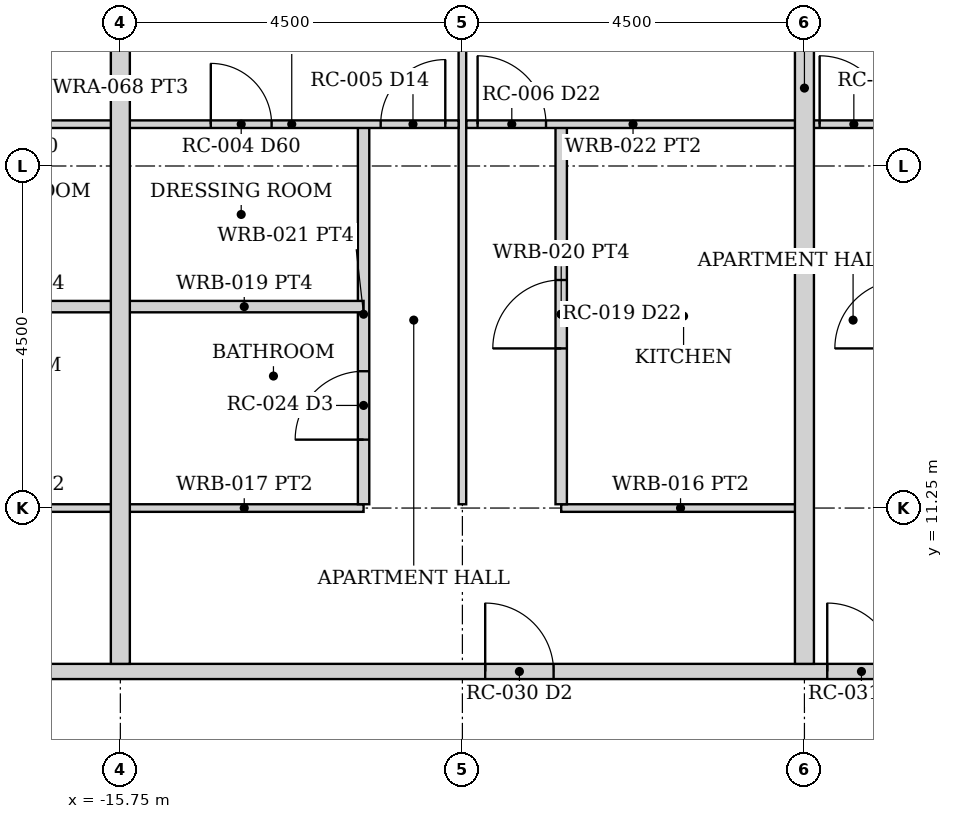
"""IFC4 building model, lengths in metres.
Left out: names, types, materials, properties, quantities, classifications, styles, units other than length and angle.
Written with IfcOpenShell. Run it as: python <this file> out.ifc"""

import sys

from ifc_helpers import new_model, si_unit, direction, frame, frame_2d, origin, place, context, subcontext, project, spatial, rectangle, extrude, element, fill, save


model = new_model("IFC4")
c1 = context("Model", 3, precision=1e-05, world=origin(), true_north=direction((0.0, 1.0)))
c2 = subcontext(c1, "Body", "Model", "MODEL_VIEW")
j1 = project(units=[si_unit("LENGTHUNIT", "METRE"), si_unit("PLANEANGLEUNIT", "RADIAN")], contexts=[c1])
p1 = place(None, origin())
s1 = spatial("IfcSite", under=j1, at=p1, CompositionType="ELEMENT")
p2 = place(p1, origin())
s2 = spatial("IfcBuilding", under=s1, at=p2, CompositionType="ELEMENT")
p3 = place(p2, frame((0.0, 0.0, 47.5)))
s3 = spatial("IfcBuildingStorey", under=s2, at=p3, CompositionType="ELEMENT", Elevation=47.5)
p4 = place(p3, frame((-24.55, 9.1, 0.0), z_axis=(0.0, 0.0, 1.0), x_axis=(1.0, 0.0, 0.0)))
e1 = element("IfcWall", 1, at=p4, inside=s3, PredefinedType="PARTITIONING", context=c2, shape_type="SweptSolid", body=[
    extrude(rectangle(XDim=49.1, YDim=0.2, at=frame_2d((24.55, 0.0))), origin(), (0.0, 0.0, 1.0), 2.373),
])
p5 = place(p4, frame((5.1, 0.0, 0.0)))
e2 = element("IfcOpeningElement", 2, at=p5, cuts=e1, PredefinedType="OPENING", context=c2, shape_type="SweptSolid", body=[
    extrude(rectangle(XDim=0.9, YDim=2.1, at=frame_2d((0.45, 1.05))), frame((0.0, 0.11, 0.0), z_axis=(0.0, -1.0, 0.0), x_axis=(1.0, 0.0, 0.0)), (0.0, 0.0, 1.0), 0.22),
])
p6 = place(p4, frame((13.6, 0.0, 0.0)))
e3 = element("IfcOpeningElement", 3, at=p6, cuts=e1, PredefinedType="OPENING", context=c2, shape_type="SweptSolid", body=[
    extrude(rectangle(XDim=0.9, YDim=2.1, at=frame_2d((0.45, 1.05))), frame((0.0, 0.11, 0.0), z_axis=(0.0, -1.0, 0.0), x_axis=(1.0, 0.0, 0.0)), (0.0, 0.0, 1.0), 0.22),
])
p7 = place(p4, frame((18.1, 0.0, 0.0)))
e4 = element("IfcOpeningElement", 4, at=p7, cuts=e1, PredefinedType="OPENING", context=c2, shape_type="SweptSolid", body=[
    extrude(rectangle(XDim=0.9, YDim=2.1, at=frame_2d((0.45, 1.05))), frame((0.0, 0.11, 0.0), z_axis=(0.0, -1.0, 0.0), x_axis=(1.0, 0.0, 0.0)), (0.0, 0.0, 1.0), 0.22),
])
p8 = place(p4, frame((31.6, 0.0, 0.0)))
e5 = element("IfcOpeningElement", 5, at=p8, cuts=e1, PredefinedType="OPENING", context=c2, shape_type="SweptSolid", body=[
    extrude(rectangle(XDim=0.9, YDim=2.1, at=frame_2d((0.45, 1.05))), frame((0.0, 0.11, 0.0), z_axis=(0.0, -1.0, 0.0), x_axis=(1.0, 0.0, 0.0)), (0.0, 0.0, 1.0), 0.22),
])
p9 = place(p4, frame((43.1, 0.0, 0.0)))
e6 = element("IfcOpeningElement", 6, at=p9, cuts=e1, PredefinedType="OPENING", context=c2, shape_type="SweptSolid", body=[
    extrude(rectangle(XDim=0.9, YDim=2.1, at=frame_2d((0.45, 1.05))), frame((0.0, 0.11, 0.0), z_axis=(0.0, -1.0, 0.0), x_axis=(1.0, 0.0, 0.0)), (0.0, 0.0, 1.0), 0.22),
])
p10 = place(p3, frame((-18.95, 11.25, 0.0), z_axis=(0.0, 0.0, 1.0), x_axis=(1.0, 0.0, 0.0)))
e7 = element("IfcWall", 7, at=p10, inside=s3, PredefinedType="PARTITIONING", context=c2, shape_type="SweptSolid", body=[
    extrude(rectangle(XDim=3.14, YDim=0.1, at=frame_2d((1.57, 0.0))), origin(), (0.0, 0.0, 1.0), 2.373),
])
p11 = place(p3, frame((-20.2, 16.3, 0.0), z_axis=(0.0, 0.0, 1.0), x_axis=(1.0, 0.0, 0.0)))
e8 = element("IfcWall", 8, at=p11, inside=s3, PredefinedType="PARTITIONING", context=c2, shape_type="SweptSolid", body=[
    extrude(rectangle(XDim=4.39, YDim=0.1, at=frame_2d((2.195, 0.0))), origin(), (0.0, 0.0, 1.0), 2.373),
])
p12 = place(p11, frame((0.175, 0.0, 0.0)))
e9 = element("IfcOpeningElement", 9, at=p12, cuts=e8, PredefinedType="OPENING", context=c2, shape_type="SweptSolid", body=[
    extrude(rectangle(XDim=0.85, YDim=2.1, at=frame_2d((0.425, 1.05))), frame((0.0, 0.06, 0.0), z_axis=(0.0, -1.0, 0.0), x_axis=(1.0, 0.0, 0.0)), (0.0, 0.0, 1.0), 0.12),
])
p13 = place(p11, frame((2.46, 0.0, 0.0)))
e10 = element("IfcOpeningElement", 10, at=p13, cuts=e8, PredefinedType="OPENING", context=c2, shape_type="SweptSolid", body=[
    extrude(rectangle(XDim=0.8, YDim=2.1, at=frame_2d((0.4, 1.05))), frame((0.0, 0.06, 0.0), z_axis=(0.0, -1.0, 0.0), x_axis=(1.0, 0.0, 0.0)), (0.0, 0.0, 1.0), 0.12),
])
p14 = place(p3, frame((-18.95, 13.9, 0.0), z_axis=(0.0, 0.0, 1.0), x_axis=(1.0, 0.0, 0.0)))
e11 = element("IfcWall", 11, at=p14, inside=s3, PredefinedType="PARTITIONING", context=c2, shape_type="SweptSolid", body=[
    extrude(rectangle(XDim=3.14, YDim=0.15, at=frame_2d((1.57, 0.0))), origin(), (0.0, 0.0, 1.0), 2.373),
])
p15 = place(p3, frame((-9.95, 11.25, 0.0), z_axis=(0.0, 0.0, 1.0), x_axis=(1.0, 0.0, 0.0)))
e12 = element("IfcWall", 12, at=p15, inside=s3, PredefinedType="PARTITIONING", context=c2, shape_type="SweptSolid", body=[
    extrude(rectangle(XDim=3.14, YDim=0.1, at=frame_2d((1.57, 0.0))), origin(), (0.0, 0.0, 1.0), 2.373),
])
p16 = place(p3, frame((-9.95, 11.3, 0.0), z_axis=(0.0, 0.0, 1.0), x_axis=(0.0, 1.0, 0.0)))
e13 = element("IfcWall", 13, at=p16, inside=s3, PredefinedType="PARTITIONING", context=c2, shape_type="SweptSolid", body=[
    extrude(rectangle(XDim=5.0, YDim=0.15, at=frame_2d((2.5, 0.0))), origin(), (0.0, 0.0, 1.0), 2.373),
])
p17 = place(p16, frame((2.05, 0.0, 0.0)))
e14 = element("IfcOpeningElement", 14, at=p17, cuts=e13, PredefinedType="OPENING", context=c2, shape_type="SweptSolid", body=[
    extrude(rectangle(XDim=0.9, YDim=2.1, at=frame_2d((0.45, 1.05))), frame((0.0, 0.085, 0.0), z_axis=(0.0, -1.0, 0.0), x_axis=(1.0, 0.0, 0.0)), (0.0, 0.0, 1.0), 0.17),
])
p18 = place(p3, frame((-11.2, 16.3, 0.0), z_axis=(0.0, 0.0, 1.0), x_axis=(1.0, 0.0, 0.0)))
e15 = element("IfcWall", 15, at=p18, inside=s3, PredefinedType="PARTITIONING", context=c2, shape_type="SweptSolid", body=[
    extrude(rectangle(XDim=4.39, YDim=0.1, at=frame_2d((2.195, 0.0))), origin(), (0.0, 0.0, 1.0), 2.373),
])
p19 = place(p18, frame((0.15, 0.0, 0.0)))
e16 = element("IfcOpeningElement", 16, at=p19, cuts=e15, PredefinedType="OPENING", context=c2, shape_type="SweptSolid", body=[
    extrude(rectangle(XDim=0.9, YDim=2.1, at=frame_2d((0.45, 1.05))), frame((0.0, 0.06, 0.0), z_axis=(0.0, -1.0, 0.0), x_axis=(1.0, 0.0, 0.0)), (0.0, 0.0, 1.0), 0.12),
])
p20 = place(p3, frame((-11.25, 11.3, 0.0), z_axis=(0.0, 0.0, 1.0), x_axis=(0.0, 1.0, 0.0)))
e17 = element("IfcWall", 17, at=p20, inside=s3, PredefinedType="PARTITIONING", context=c2, shape_type="SweptSolid", body=[
    extrude(rectangle(XDim=13.05, YDim=0.1, at=frame_2d((6.525, 0.0))), origin(), (0.0, 0.0, 1.0), 2.373),
])
p21 = place(p3, frame((-15.69, 11.25, 0.0), z_axis=(0.0, 0.0, 1.0), x_axis=(1.0, 0.0, 0.0)))
e18 = element("IfcWall", 18, at=p21, inside=s3, PredefinedType="PARTITIONING", context=c2, shape_type="SweptSolid", body=[
    extrude(rectangle(XDim=3.14, YDim=0.1, at=frame_2d((1.57, 0.0))), origin(), (0.0, 0.0, 1.0), 2.373),
])
p22 = place(p3, frame((-12.55, 11.3, 0.0), z_axis=(0.0, 0.0, 1.0), x_axis=(0.0, 1.0, 0.0)))
e19 = element("IfcWall", 19, at=p22, inside=s3, PredefinedType="PARTITIONING", context=c2, shape_type="SweptSolid", body=[
    extrude(rectangle(XDim=5.0, YDim=0.15, at=frame_2d((2.5, 0.0))), origin(), (0.0, 0.0, 1.0), 2.373),
])
p23 = place(p22, frame((0.85, 0.0, 0.0)))
e20 = element("IfcOpeningElement", 20, at=p23, cuts=e19, PredefinedType="OPENING", context=c2, shape_type="SweptSolid", body=[
    extrude(rectangle(XDim=0.9, YDim=2.1, at=frame_2d((0.45, 1.05))), frame((0.0, 0.085, 0.0), z_axis=(0.0, -1.0, 0.0), x_axis=(1.0, 0.0, 0.0)), (0.0, 0.0, 1.0), 0.17),
])
p24 = place(p3, frame((-15.69, 16.3, 0.0), z_axis=(0.0, 0.0, 1.0), x_axis=(1.0, 0.0, 0.0)))
e21 = element("IfcWall", 21, at=p24, inside=s3, PredefinedType="PARTITIONING", context=c2, shape_type="SweptSolid", body=[
    extrude(rectangle(XDim=4.39, YDim=0.1, at=frame_2d((2.195, 0.0))), origin(), (0.0, 0.0, 1.0), 2.373),
])
p25 = place(p24, frame((3.365, 0.0, 0.0)))
e22 = element("IfcOpeningElement", 22, at=p25, cuts=e21, PredefinedType="OPENING", context=c2, shape_type="SweptSolid", body=[
    extrude(rectangle(XDim=0.85, YDim=2.1, at=frame_2d((0.425, 1.05))), frame((0.0, 0.06, 0.0), z_axis=(0.0, -1.0, 0.0), x_axis=(1.0, 0.0, 0.0)), (0.0, 0.0, 1.0), 0.12),
])
p26 = place(p24, frame((1.13, 0.0, 0.0)))
e23 = element("IfcOpeningElement", 23, at=p26, cuts=e21, PredefinedType="OPENING", context=c2, shape_type="SweptSolid", body=[
    extrude(rectangle(XDim=0.8, YDim=2.1, at=frame_2d((0.4, 1.05))), frame((0.0, 0.06, 0.0), z_axis=(0.0, -1.0, 0.0), x_axis=(1.0, 0.0, 0.0)), (0.0, 0.0, 1.0), 0.12),
])
p27 = place(p3, frame((-15.69, 13.9, 0.0), z_axis=(0.0, 0.0, 1.0), x_axis=(1.0, 0.0, 0.0)))
e24 = element("IfcWall", 24, at=p27, inside=s3, PredefinedType="PARTITIONING", context=c2, shape_type="SweptSolid", body=[
    extrude(rectangle(XDim=3.14, YDim=0.15, at=frame_2d((1.57, 0.0))), origin(), (0.0, 0.0, 1.0), 2.373),
])
p28 = place(p3, frame((-6.69, 16.3, 0.0), z_axis=(0.0, 0.0, 1.0), x_axis=(1.0, 0.0, 0.0)))
e25 = element("IfcWall", 25, at=p28, inside=s3, PredefinedType="PARTITIONING", context=c2, shape_type="SweptSolid", body=[
    extrude(rectangle(XDim=4.39, YDim=0.1, at=frame_2d((2.195, 0.0))), origin(), (0.0, 0.0, 1.0), 2.373),
])
p29 = place(p28, frame((0.14, 0.0, 0.0)))
e26 = element("IfcOpeningElement", 26, at=p29, cuts=e25, PredefinedType="OPENING", context=c2, shape_type="SweptSolid", body=[
    extrude(rectangle(XDim=0.9, YDim=2.1, at=frame_2d((0.45, 1.05))), frame((0.0, 0.06, 0.0), z_axis=(0.0, -1.0, 0.0), x_axis=(1.0, 0.0, 0.0)), (0.0, 0.0, 1.0), 0.12),
])
for number, where, z_axis, x_axis in (
    (27, (-15.75, 9.2, 0.0), (0.0, 0.0, 1.0), (0.0, 1.0, 0.0)),
    (28, (-6.75, 9.2, 0.0), (0.0, 0.0, 1.0), (0.0, 1.0, 0.0)),
):
    element("IfcWall", number, at=place(p3, frame(where, z_axis=z_axis, x_axis=x_axis)), inside=s3, PredefinedType="PARTITIONING", context=c2, shape_type="SweptSolid", body=[
        extrude(rectangle(XDim=15.15, YDim=0.25, at=frame_2d((7.575, 0.0))), origin(), (0.0, 0.0, 1.0), 2.373),
    ])
p30 = place(p6, origin())
e29 = element("IfcDoor", 29, at=p30, inside=s3, OperationType="SINGLE_SWING_LEFT", PredefinedType="DOOR", context=c2, shape_type="SweptSolid", body=[
    extrude(rectangle(XDim=0.9, YDim=2.1, at=frame_2d((0.45, 1.05))), frame((0.0, 0.025, 0.0), z_axis=(0.0, -1.0, 0.0), x_axis=(1.0, 0.0, 0.0)), (0.0, 0.0, 1.0), 0.05),
])
fill(e3, e29)
p31 = place(p17, origin())
e30 = element("IfcDoor", 30, at=p31, inside=s3, OperationType="SINGLE_SWING_LEFT", PredefinedType="DOOR", context=c2, shape_type="SweptSolid", body=[
    extrude(rectangle(XDim=0.9, YDim=2.1, at=frame_2d((0.45, 1.05))), frame((0.0, 0.025, 0.0), z_axis=(0.0, -1.0, 0.0), x_axis=(1.0, 0.0, 0.0)), (0.0, 0.0, 1.0), 0.05),
])
fill(e14, e30)
p32 = place(p19, origin())
e31 = element("IfcDoor", 31, at=p32, inside=s3, OperationType="SINGLE_SWING_LEFT", PredefinedType="DOOR", context=c2, shape_type="SweptSolid", body=[
    extrude(rectangle(XDim=0.9, YDim=2.1, at=frame_2d((0.45, 1.05))), frame((0.0, 0.025, 0.0), z_axis=(0.0, -1.0, 0.0), x_axis=(1.0, 0.0, 0.0)), (0.0, 0.0, 1.0), 0.05),
])
fill(e16, e31)
p33 = place(p25, origin())
e32 = element("IfcDoor", 32, at=p33, inside=s3, OperationType="SINGLE_SWING_RIGHT", PredefinedType="DOOR", context=c2, shape_type="SweptSolid", body=[
    extrude(rectangle(XDim=0.85, YDim=2.1, at=frame_2d((0.425, 1.05))), frame((0.0, 0.025, 0.0), z_axis=(0.0, -1.0, 0.0), x_axis=(1.0, 0.0, 0.0)), (0.0, 0.0, 1.0), 0.05),
])
fill(e22, e32)
p34 = place(p23, origin())
e33 = element("IfcDoor", 33, at=p34, inside=s3, OperationType="SINGLE_SWING_LEFT", PredefinedType="DOOR", context=c2, shape_type="SweptSolid", body=[
    extrude(rectangle(XDim=0.9, YDim=2.1, at=frame_2d((0.45, 1.05))), frame((0.0, 0.025, 0.0), z_axis=(0.0, -1.0, 0.0), x_axis=(1.0, 0.0, 0.0)), (0.0, 0.0, 1.0), 0.05),
])
fill(e20, e33)
p35 = place(p26, origin())
e34 = element("IfcDoor", 34, at=p35, inside=s3, OperationType="SINGLE_SWING_LEFT", PredefinedType="DOOR", context=c2, shape_type="SweptSolid", body=[
    extrude(rectangle(XDim=0.8, YDim=2.1, at=frame_2d((0.4, 1.05))), frame((0.0, 0.025, 0.0), z_axis=(0.0, -1.0, 0.0), x_axis=(1.0, 0.0, 0.0)), (0.0, 0.0, 1.0), 0.05),
])
fill(e23, e34)
p36 = place(p7, origin())
e35 = element("IfcDoor", 35, at=p36, inside=s3, OperationType="SINGLE_SWING_LEFT", PredefinedType="DOOR", context=c2, shape_type="SweptSolid", body=[
    extrude(rectangle(XDim=0.9, YDim=2.1, at=frame_2d((0.45, 1.05))), frame((0.0, 0.025, 0.0), z_axis=(0.0, -1.0, 0.0), x_axis=(1.0, 0.0, 0.0)), (0.0, 0.0, 1.0), 0.05),
])
fill(e4, e35)
p37 = place(p29, origin())
e36 = element("IfcDoor", 36, at=p37, inside=s3, OperationType="SINGLE_SWING_LEFT", PredefinedType="DOOR", context=c2, shape_type="SweptSolid", body=[
    extrude(rectangle(XDim=0.9, YDim=2.1, at=frame_2d((0.45, 1.05))), frame((0.0, 0.025, 0.0), z_axis=(0.0, -1.0, 0.0), x_axis=(1.0, 0.0, 0.0)), (0.0, 0.0, 1.0), 0.05),
])
fill(e26, e36)
save(model, sys.argv[1])
